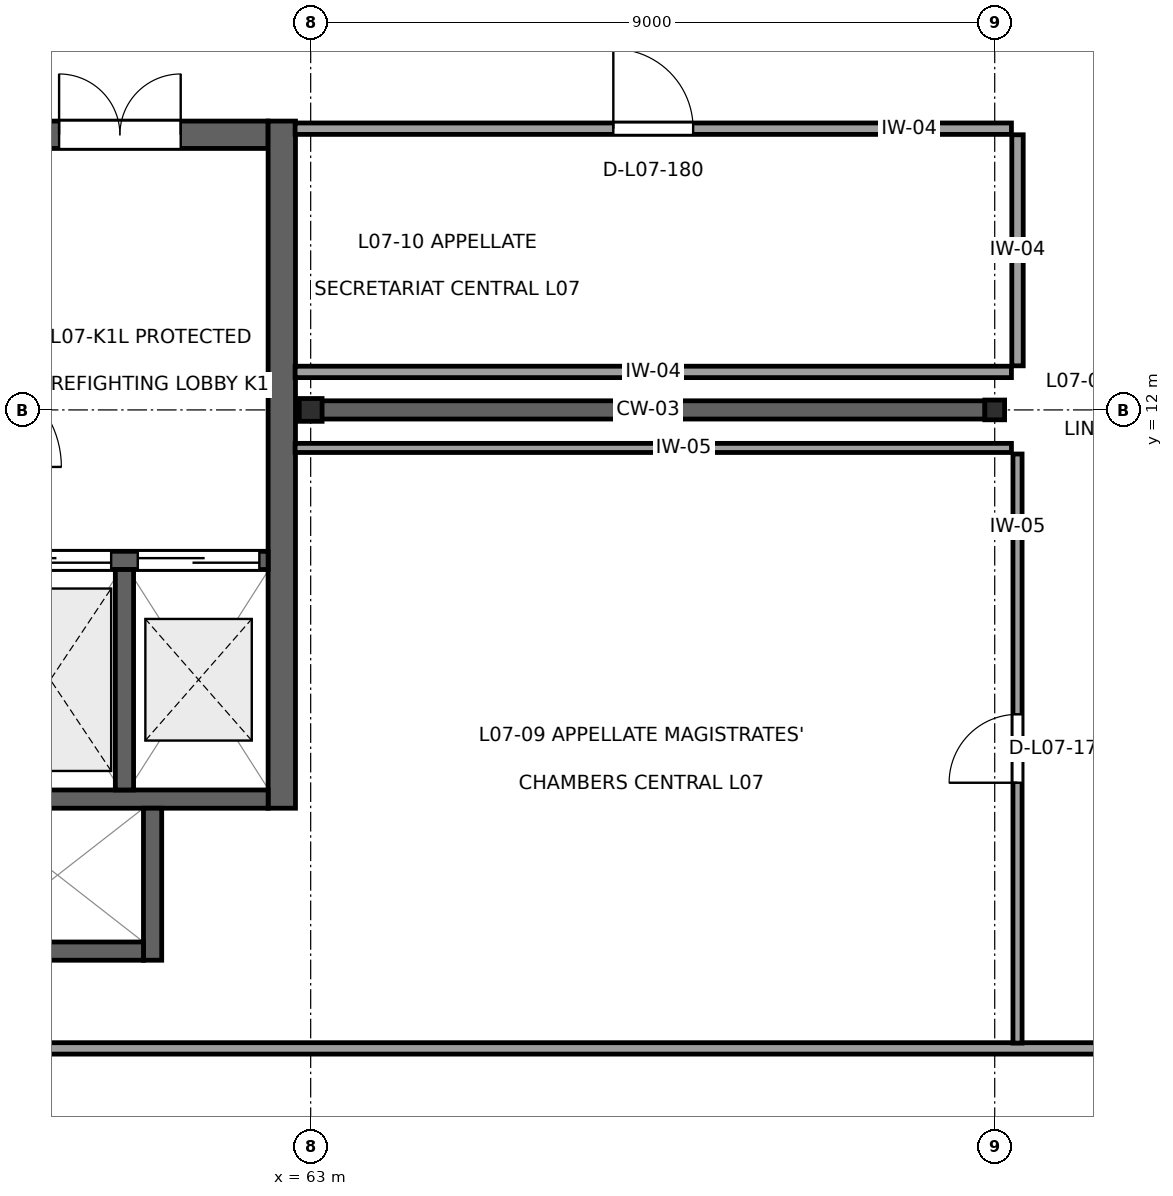
"""IFC4 building model, lengths in metres.
Left out: names, types, materials, properties, quantities, classifications, styles, units other than length and angle.
Written with IfcOpenShell. Run it as: python <this file> out.ifc"""

import sys

from ifc_helpers import new_model, si_unit, direction, frame, frame_2d, origin, origin_2d, place, context, subcontext, project, spatial, rectangle, i_section, extrude, element, fill, save


model = new_model("IFC4")
c1 = context("Model", 3, precision=1e-05, world=origin(), true_north=direction((0.0, 1.0)))
c2 = subcontext(c1, "Body", "Model", "MODEL_VIEW")
j1 = project(units=[si_unit("LENGTHUNIT", "METRE"), si_unit("PLANEANGLEUNIT", "RADIAN")], contexts=[c1])
p1 = place(None, origin())
s1 = spatial("IfcSite", under=j1, at=p1, CompositionType="ELEMENT")
p2 = place(p1, origin())
s2 = spatial("IfcBuilding", under=s1, at=p2, CompositionType="ELEMENT")
p3 = place(p2, frame((0.0, 0.0, 31.4)))
s3 = spatial("IfcBuildingStorey", under=s2, at=p3, CompositionType="ELEMENT", Elevation=31.4)
p4 = place(p3, frame((63.0, 12.0, 0.0), z_axis=(0.0, 0.0, 1.0), x_axis=(1.0, 0.0, 0.0)))
e1 = element("IfcColumn", 1, at=p4, inside=s3, PredefinedType="COLUMN", context=c2, shape_type="SweptSolid", body=[
    extrude(i_section(OverallWidth=0.3, OverallDepth=0.3, WebThickness=0.011, FlangeThickness=0.019, at=origin_2d()), origin(), (0.0, 0.0, 1.0), 4.0),
])
p5 = place(p3, frame((72.0, 12.0, 0.0), z_axis=(0.0, 0.0, 1.0), x_axis=(0.0, 1.0, 0.0)))
e2 = element("IfcColumn", 2, at=p5, inside=s3, PredefinedType="COLUMN", context=c2, shape_type="SweptSolid", body=[
    extrude(i_section(OverallWidth=0.26, OverallDepth=0.26, WebThickness=0.01, FlangeThickness=0.018, at=origin_2d()), origin(), (0.0, 0.0, 1.0), 4.0),
])
p6 = place(p3, frame((58.54, 15.62, 0.0), z_axis=(0.0, 0.0, 1.0), x_axis=(1.0, 0.0, 0.0)))
e3 = element("IfcWall", 3, at=p6, inside=s3, PredefinedType="SHEAR", context=c2, shape_type="SweptSolid", body=[
    extrude(rectangle(XDim=3.9, YDim=0.36, at=frame_2d((1.95, 0.0))), origin(), (0.0, 0.0, 1.0), 3.66),
])
p7 = place(p6, frame((1.15, 0.0, 0.0)))
e4 = element("IfcOpeningElement", 4, at=p7, cuts=e3, PredefinedType="OPENING", context=c2, shape_type="SweptSolid", body=[
    extrude(rectangle(XDim=1.6, YDim=2.25, at=frame_2d((0.8, 1.125))), frame((0.0, 0.195, 0.0), z_axis=(0.0, -1.0, 0.0), x_axis=(1.0, 0.0, 0.0)), (0.0, 0.0, 1.0), 0.39),
])
p8 = place(p3, frame((62.62, 6.76, 0.0), z_axis=(0.0, 0.0, 1.0), x_axis=(0.0, 1.0, 0.0)))
e5 = element("IfcWall", 5, at=p8, inside=s3, PredefinedType="SHEAR", context=c2, shape_type="SweptSolid", body=[
    extrude(rectangle(XDim=9.04, YDim=0.36, at=frame_2d((4.52, 0.0))), origin(), (0.0, 0.0, 1.0), 3.66),
])
p9 = place(p3, frame((58.54, 10.02, 0.0), z_axis=(0.0, 0.0, 1.0), x_axis=(1.0, 0.0, 0.0)))
e6 = element("IfcWall", 6, at=p9, inside=s3, PredefinedType="SHEAR", context=c2, shape_type="SweptSolid", body=[
    extrude(rectangle(XDim=3.9, YDim=0.24, at=frame_2d((1.95, 0.0))), origin(), (0.0, 0.0, 1.0), 3.81),
])
p10 = place(p9, frame((0.235, 0.0, 0.0)))
e7 = element("IfcOpeningElement", 7, at=p10, cuts=e6, PredefinedType="OPENING", context=c2, shape_type="SweptSolid", body=[
    extrude(rectangle(XDim=1.6, YDim=2.3, at=frame_2d((0.8, 1.15))), frame((0.0, 0.135, 0.0), z_axis=(0.0, -1.0, 0.0), x_axis=(1.0, 0.0, 0.0)), (0.0, 0.0, 1.0), 0.27),
])
p11 = place(p9, frame((2.185, 0.0, 0.0)))
e8 = element("IfcOpeningElement", 8, at=p11, cuts=e6, PredefinedType="OPENING", context=c2, shape_type="SweptSolid", body=[
    extrude(rectangle(XDim=1.6, YDim=2.3, at=frame_2d((0.8, 1.15))), frame((0.0, 0.135, 0.0), z_axis=(0.0, -1.0, 0.0), x_axis=(1.0, 0.0, 0.0)), (0.0, 0.0, 1.0), 0.27),
])
p12 = place(p3, frame((58.54, 6.88, 0.0), z_axis=(0.0, 0.0, 1.0), x_axis=(1.0, 0.0, 0.0)))
e9 = element("IfcWall", 9, at=p12, inside=s3, PredefinedType="SHEAR", context=c2, shape_type="SweptSolid", body=[
    extrude(rectangle(XDim=3.9, YDim=0.24, at=frame_2d((1.95, 0.0))), origin(), (0.0, 0.0, 1.0), 3.81),
])
p13 = place(p3, frame((60.55, 7.0, 0.0), z_axis=(0.0, 0.0, 1.0), x_axis=(0.0, 1.0, 0.0)))
e10 = element("IfcWall", 10, at=p13, inside=s3, PredefinedType="SHEAR", context=c2, shape_type="SweptSolid", body=[
    extrude(rectangle(XDim=2.9, YDim=0.24, at=frame_2d((1.45, 0.0))), origin(), (0.0, 0.0, 1.0), 3.81),
])
p14 = place(p3, frame((60.92, 4.76, 0.0), z_axis=(0.0, 0.0, 1.0), x_axis=(0.0, 1.0, 0.0)))
e11 = element("IfcWall", 11, at=p14, inside=s3, PredefinedType="SHEAR", context=c2, shape_type="SweptSolid", body=[
    extrude(rectangle(XDim=2.0, YDim=0.24, at=frame_2d((1.0, 0.0))), origin(), (0.0, 0.0, 1.0), 3.81),
])
p15 = place(p3, frame((58.54, 4.88, 0.0), z_axis=(0.0, 0.0, 1.0), x_axis=(1.0, 0.0, 0.0)))
e12 = element("IfcWall", 12, at=p15, inside=s3, PredefinedType="SHEAR", context=c2, shape_type="SweptSolid", body=[
    extrude(rectangle(XDim=2.26, YDim=0.24, at=frame_2d((1.13, 0.0))), origin(), (0.0, 0.0, 1.0), 3.81),
])
p16 = place(p3, frame((63.008, 12.0, 0.0), z_axis=(0.0, 0.0, 1.0), x_axis=(1.0, 0.0, 0.0)))
e13 = element("IfcWall", 13, at=p16, inside=s3, PredefinedType="SHEAR", context=c2, shape_type="SweptSolid", body=[
    extrude(rectangle(XDim=8.864, YDim=0.24, at=frame_2d((4.432, 0.0))), origin(), (0.0, 0.0, 1.0), 3.305),
])
p17 = place(p3, frame((45.88, 3.6, 0.0), z_axis=(0.0, 0.0, 1.0), x_axis=(1.0, 0.0, 0.0)))
e14 = element("IfcWall", 14, at=p17, inside=s3, PredefinedType="PARTITIONING", context=c2, shape_type="SweptSolid", body=[
    extrude(rectangle(XDim=58.24, YDim=0.15, at=frame_2d((29.12, 0.0))), origin(), (0.0, 0.0, 1.0), 3.64),
])
p18 = place(p17, frame((27.795, 0.0, 0.0)))
e15 = element("IfcOpeningElement", 15, at=p18, cuts=e14, PredefinedType="OPENING", context=c2, shape_type="SweptSolid", body=[
    extrude(rectangle(XDim=1.05, YDim=2.25, at=frame_2d((0.525, 1.125))), frame((0.0, 0.09, 0.0), z_axis=(0.0, -1.0, 0.0), x_axis=(1.0, 0.0, 0.0)), (0.0, 0.0, 1.0), 0.18),
])
p19 = place(p3, frame((62.795, 11.5, 0.0), z_axis=(0.0, 0.0, 1.0), x_axis=(1.0, 0.0, 0.0)))
e16 = element("IfcWall", 16, at=p19, inside=s3, PredefinedType="PARTITIONING", context=c2, shape_type="SweptSolid", body=[
    extrude(rectangle(XDim=9.425, YDim=0.12, at=frame_2d((4.712, 0.0))), origin(), (0.0, 0.0, 1.0), 3.64),
])
p20 = place(p3, frame((72.3, 11.42, 0.0), z_axis=(0.0, 0.0, 1.0), x_axis=(0.0, -1.0, 0.0)))
e17 = element("IfcWall", 17, at=p20, inside=s3, PredefinedType="PARTITIONING", context=c2, shape_type="SweptSolid", body=[
    extrude(rectangle(XDim=7.75, YDim=0.12, at=frame_2d((3.875, 0.0))), origin(), (0.0, 0.0, 1.0), 3.64),
])
p21 = place(p20, frame((3.425, 0.0, 0.0)))
e18 = element("IfcOpeningElement", 18, at=p21, cuts=e17, PredefinedType="OPENING", context=c2, shape_type="SweptSolid", body=[
    extrude(rectangle(XDim=0.9, YDim=2.1, at=frame_2d((0.45, 1.05))), frame((0.0, 0.075, 0.0), z_axis=(0.0, -1.0, 0.0), x_axis=(1.0, 0.0, 0.0)), (0.0, 0.0, 1.0), 0.15),
])
p22 = place(p3, frame((62.795, 15.7, 0.0), z_axis=(0.0, 0.0, 1.0), x_axis=(1.0, 0.0, 0.0)))
e19 = element("IfcWall", 19, at=p22, inside=s3, PredefinedType="PARTITIONING", context=c2, shape_type="SweptSolid", body=[
    extrude(rectangle(XDim=9.425, YDim=0.15, at=frame_2d((4.712, 0.0))), origin(), (0.0, 0.0, 1.0), 3.64),
])
p23 = place(p22, frame((4.187, 0.0, 0.0)))
e20 = element("IfcOpeningElement", 20, at=p23, cuts=e19, PredefinedType="OPENING", context=c2, shape_type="SweptSolid", body=[
    extrude(rectangle(XDim=1.05, YDim=2.25, at=frame_2d((0.525, 1.125))), frame((0.0, 0.09, 0.0), z_axis=(0.0, -1.0, 0.0), x_axis=(1.0, 0.0, 0.0)), (0.0, 0.0, 1.0), 0.18),
])
p24 = place(p3, frame((72.3, 15.62, 0.0), z_axis=(0.0, 0.0, 1.0), x_axis=(0.0, -1.0, 0.0)))
e21 = element("IfcWall", 21, at=p24, inside=s3, PredefinedType="PARTITIONING", context=c2, shape_type="SweptSolid", body=[
    extrude(rectangle(XDim=3.04, YDim=0.15, at=frame_2d((1.52, 0.0))), origin(), (0.0, 0.0, 1.0), 3.64),
])
p25 = place(p3, frame((72.22, 12.5, 0.0), z_axis=(0.0, 0.0, 1.0), x_axis=(-1.0, 0.0, 0.0)))
e22 = element("IfcWall", 22, at=p25, inside=s3, PredefinedType="PARTITIONING", context=c2, shape_type="SweptSolid", body=[
    extrude(rectangle(XDim=9.425, YDim=0.15, at=frame_2d((4.712, 0.0))), origin(), (0.0, 0.0, 1.0), 3.64),
])
p26 = place(p7, origin())
e23 = element("IfcDoor", 23, at=p26, inside=s3, OperationType="DOUBLE_DOOR_SINGLE_SWING", PredefinedType="DOOR", context=c2, shape_type="SweptSolid", body=[
    extrude(rectangle(XDim=1.6, YDim=2.25, at=frame_2d((0.8, 1.125))), frame((0.0, 0.025, 0.0), z_axis=(0.0, -1.0, 0.0), x_axis=(1.0, 0.0, 0.0)), (0.0, 0.0, 1.0), 0.05),
])
fill(e4, e23)
p27 = place(p10, origin())
e24 = element("IfcDoor", 24, at=p27, inside=s3, OperationType="DOUBLE_DOOR_SLIDING", PredefinedType="DOOR", context=c2, shape_type="SweptSolid", body=[
    extrude(rectangle(XDim=1.6, YDim=2.3, at=frame_2d((0.8, 1.15))), frame((0.0, 0.025, 0.0), z_axis=(0.0, -1.0, 0.0), x_axis=(1.0, 0.0, 0.0)), (0.0, 0.0, 1.0), 0.05),
])
fill(e7, e24)
p28 = place(p11, origin())
e25 = element("IfcDoor", 25, at=p28, inside=s3, OperationType="DOUBLE_DOOR_SLIDING", PredefinedType="DOOR", context=c2, shape_type="SweptSolid", body=[
    extrude(rectangle(XDim=1.6, YDim=2.3, at=frame_2d((0.8, 1.15))), frame((0.0, 0.025, 0.0), z_axis=(0.0, -1.0, 0.0), x_axis=(1.0, 0.0, 0.0)), (0.0, 0.0, 1.0), 0.05),
])
fill(e8, e25)
p29 = place(p21, frame((0.9, 0.0, 0.0), z_axis=(0.0, 0.0, 1.0), x_axis=(-1.0, 0.0, 0.0)))
e26 = element("IfcDoor", 26, at=p29, inside=s3, OperationType="SINGLE_SWING_RIGHT", PredefinedType="DOOR", context=c2, shape_type="SweptSolid", body=[
    extrude(rectangle(XDim=0.9, YDim=2.1, at=frame_2d((0.45, 1.05))), frame((0.0, 0.025, 0.0), z_axis=(0.0, -1.0, 0.0), x_axis=(1.0, 0.0, 0.0)), (0.0, 0.0, 1.0), 0.05),
])
fill(e18, e26)
p30 = place(p23, origin())
e27 = element("IfcDoor", 27, at=p30, inside=s3, OperationType="SINGLE_SWING_LEFT", PredefinedType="DOOR", context=c2, shape_type="SweptSolid", body=[
    extrude(rectangle(XDim=1.05, YDim=2.25, at=frame_2d((0.525, 1.125))), frame((0.0, 0.025, 0.0), z_axis=(0.0, -1.0, 0.0), x_axis=(1.0, 0.0, 0.0)), (0.0, 0.0, 1.0), 0.05),
])
fill(e20, e27)
save(model, sys.argv[1])
